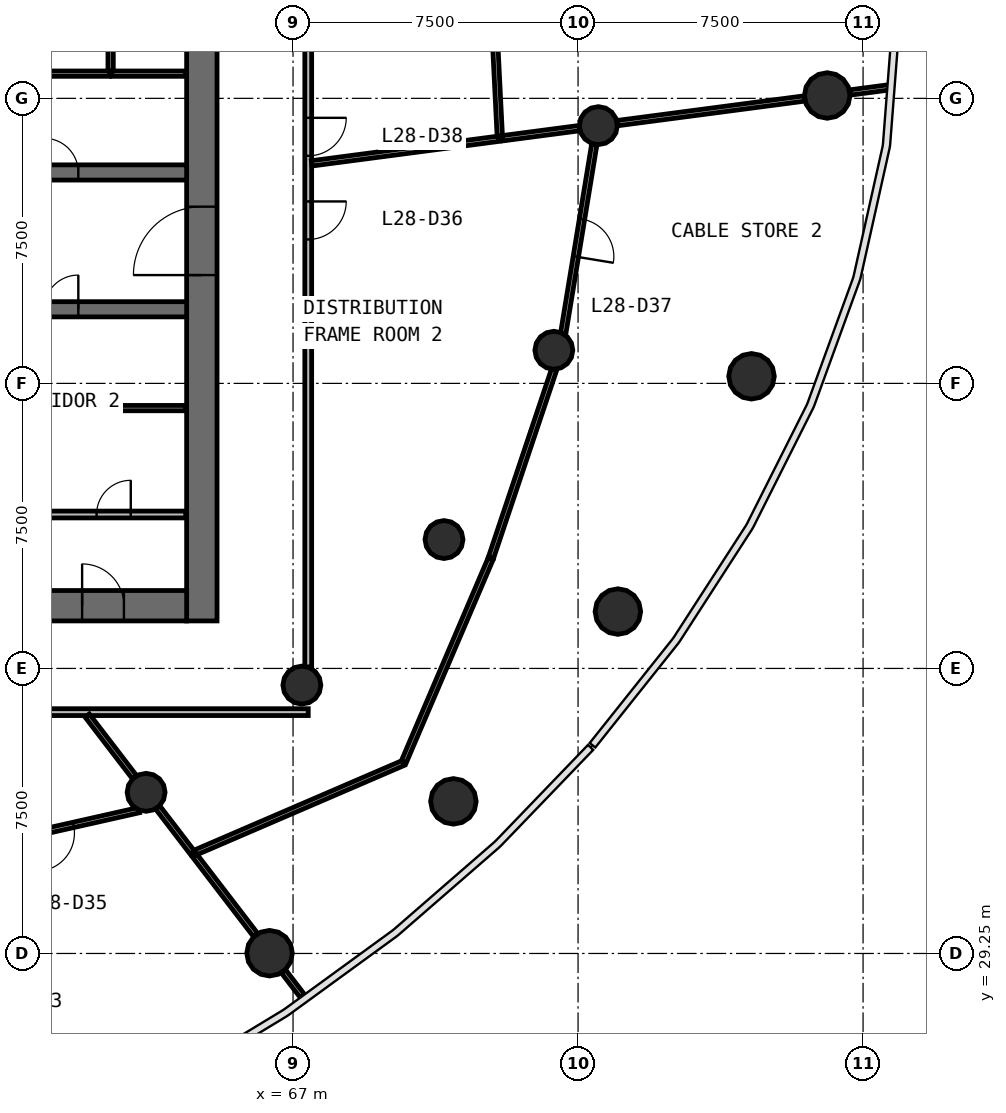
"""IFC4 building model, lengths in metres.
Left out: names, types, materials, properties, quantities, classifications, styles, units other than length and angle.
Written with IfcOpenShell. Run it as: python <this file> out.ifc"""

import sys

from ifc_helpers import new_model, si_unit, direction, frame, frame_2d, origin, origin_2d, place, context, subcontext, project, spatial, rectangle, circle, extrude, source, transform, mapped, element, fill, save


model = new_model("IFC4")
c1 = context("Model", 3, precision=1e-05, world=origin(), true_north=direction((0.0, 1.0)))
c2 = subcontext(c1, "Body", "Model", "MODEL_VIEW")
j1 = project(units=[si_unit("LENGTHUNIT", "METRE"), si_unit("PLANEANGLEUNIT", "RADIAN")], contexts=[c1])
p1 = place(None, origin())
s1 = spatial("IfcSite", under=j1, at=p1, CompositionType="ELEMENT")
p2 = place(p1, origin())
s2 = spatial("IfcBuilding", under=s1, at=p2, CompositionType="ELEMENT")
p3 = place(p2, frame((0.0, 0.0, 120.8)))
s3 = spatial("IfcBuildingStorey", under=s2, at=p3, CompositionType="ELEMENT", Elevation=120.8)
p4 = place(p3, frame((64.6, 38.0, 0.0), z_axis=(0.0, 0.0, 1.0), x_axis=(0.0, 1.0, 0.0)))
e1 = element("IfcWall", 1, at=p4, inside=s3, PredefinedType="SHEAR", context=c2, shape_type="SweptSolid", body=[
    extrude(rectangle(XDim=20.0, YDim=0.8, at=frame_2d((10.0, 0.0))), origin(), (0.0, 0.0, 1.0), 4.1),
])
p5 = place(p4, frame((9.1, 0.0, 0.0)))
e2 = element("IfcOpeningElement", 2, at=p5, cuts=e1, PredefinedType="OPENING", context=c2, shape_type="SweptSolid", body=[
    extrude(rectangle(XDim=1.8, YDim=2.1, at=frame_2d((0.9, 1.05))), frame((0.0, 0.41, 0.0), z_axis=(0.0, -1.0, 0.0), x_axis=(1.0, 0.0, 0.0)), (0.0, 0.0, 1.0), 0.82),
])
p6 = place(p3, frame((39.8, 38.4, 0.0), z_axis=(0.0, 0.0, 1.0), x_axis=(1.0, 0.0, 0.0)))
e3 = element("IfcWall", 3, at=p6, inside=s3, PredefinedType="SHEAR", context=c2, shape_type="SweptSolid", body=[
    extrude(rectangle(XDim=24.4, YDim=0.8, at=frame_2d((12.2, 0.0))), origin(), (0.0, 0.0, 1.0), 4.1),
])
p7 = place(p6, frame((21.65, 0.0, 0.0)))
e4 = element("IfcOpeningElement", 4, at=p7, cuts=e3, PredefinedType="OPENING", context=c2, shape_type="SweptSolid", body=[
    extrude(rectangle(XDim=1.1, YDim=2.1, at=frame_2d((0.55, 1.05))), frame((0.0, 0.41, 0.0), z_axis=(0.0, -1.0, 0.0), x_axis=(1.0, 0.0, 0.0)), (0.0, 0.0, 1.0), 0.82),
])
p8 = place(p6, frame((2.15, 0.0, 0.0)))
e5 = element("IfcOpeningElement", 5, at=p8, cuts=e3, PredefinedType="OPENING", context=c2, shape_type="SweptSolid", body=[
    extrude(rectangle(XDim=1.1, YDim=2.1, at=frame_2d((0.55, 1.05))), frame((0.0, 0.41, 0.0), z_axis=(0.0, -1.0, 0.0), x_axis=(1.0, 0.0, 0.0)), (0.0, 0.0, 1.0), 0.82),
])
p9 = place(p3, frame((39.8, 49.8, 0.0), z_axis=(0.0, 0.0, 1.0), x_axis=(1.0, 0.0, 0.0)))
e6 = element("IfcWall", 6, at=p9, inside=s3, PredefinedType="SHEAR", context=c2, shape_type="SweptSolid", body=[
    extrude(rectangle(XDim=24.4, YDim=0.4, at=frame_2d((12.2, 0.0))), origin(), (0.0, 0.0, 1.0), 4.1),
])
p10 = place(p9, frame((4.7, 0.0, 0.0)))
e7 = element("IfcOpeningElement", 7, at=p10, cuts=e6, PredefinedType="OPENING", context=c2, shape_type="SweptSolid", body=[
    extrude(rectangle(XDim=1.1, YDim=2.1, at=frame_2d((0.55, 1.05))), frame((0.0, 0.21, 0.0), z_axis=(0.0, -1.0, 0.0), x_axis=(1.0, 0.0, 0.0)), (0.0, 0.0, 1.0), 0.42),
])
p11 = place(p9, frame((7.2, 0.0, 0.0)))
e8 = element("IfcOpeningElement", 8, at=p11, cuts=e6, PredefinedType="OPENING", context=c2, shape_type="SweptSolid", body=[
    extrude(rectangle(XDim=1.1, YDim=2.1, at=frame_2d((0.55, 1.05))), frame((0.0, 0.21, 0.0), z_axis=(0.0, -1.0, 0.0), x_axis=(1.0, 0.0, 0.0)), (0.0, 0.0, 1.0), 0.42),
])
p12 = place(p9, frame((9.7, 0.0, 0.0)))
e9 = element("IfcOpeningElement", 9, at=p12, cuts=e6, PredefinedType="OPENING", context=c2, shape_type="SweptSolid", body=[
    extrude(rectangle(XDim=1.1, YDim=2.1, at=frame_2d((0.55, 1.05))), frame((0.0, 0.21, 0.0), z_axis=(0.0, -1.0, 0.0), x_axis=(1.0, 0.0, 0.0)), (0.0, 0.0, 1.0), 0.42),
])
p13 = place(p9, frame((1.1, 0.0, 0.0)))
e10 = element("IfcOpeningElement", 10, at=p13, cuts=e6, PredefinedType="OPENING", context=c2, shape_type="SweptSolid", body=[
    extrude(rectangle(XDim=1.8, YDim=2.4, at=frame_2d((0.9, 1.2))), frame((0.0, 0.21, 0.0), z_axis=(0.0, -1.0, 0.0), x_axis=(1.0, 0.0, 0.0)), (0.0, 0.0, 1.0), 0.42),
])
p14 = place(p9, frame((20.65, 0.0, 0.0)))
e11 = element("IfcOpeningElement", 11, at=p14, cuts=e6, PredefinedType="OPENING", context=c2, shape_type="SweptSolid", body=[
    extrude(rectangle(XDim=0.9, YDim=2.1, at=frame_2d((0.45, 1.05))), frame((0.0, 0.21, 0.0), z_axis=(0.0, -1.0, 0.0), x_axis=(1.0, 0.0, 0.0)), (0.0, 0.0, 1.0), 0.42),
])
p15 = place(p9, frame((11.85, 0.0, 0.0)))
e12 = element("IfcOpeningElement", 12, at=p15, cuts=e6, PredefinedType="OPENING", context=c2, shape_type="SweptSolid", body=[
    extrude(rectangle(XDim=0.9, YDim=2.1, at=frame_2d((0.45, 1.05))), frame((0.0, 0.21, 0.0), z_axis=(0.0, -1.0, 0.0), x_axis=(1.0, 0.0, 0.0)), (0.0, 0.0, 1.0), 0.42),
])
p16 = place(p3, frame((39.8, 46.2, 0.0), z_axis=(0.0, 0.0, 1.0), x_axis=(1.0, 0.0, 0.0)))
e13 = element("IfcWall", 13, at=p16, inside=s3, PredefinedType="SHEAR", context=c2, shape_type="SweptSolid", body=[
    extrude(rectangle(XDim=24.4, YDim=0.4, at=frame_2d((12.2, 0.0))), origin(), (0.0, 0.0, 1.0), 4.1),
])
p17 = place(p16, frame((4.7, 0.0, 0.0)))
e14 = element("IfcOpeningElement", 14, at=p17, cuts=e13, PredefinedType="OPENING", context=c2, shape_type="SweptSolid", body=[
    extrude(rectangle(XDim=1.1, YDim=2.1, at=frame_2d((0.55, 1.05))), frame((0.0, 0.21, 0.0), z_axis=(0.0, -1.0, 0.0), x_axis=(1.0, 0.0, 0.0)), (0.0, 0.0, 1.0), 0.42),
])
p18 = place(p16, frame((7.2, 0.0, 0.0)))
e15 = element("IfcOpeningElement", 15, at=p18, cuts=e13, PredefinedType="OPENING", context=c2, shape_type="SweptSolid", body=[
    extrude(rectangle(XDim=1.1, YDim=2.1, at=frame_2d((0.55, 1.05))), frame((0.0, 0.21, 0.0), z_axis=(0.0, -1.0, 0.0), x_axis=(1.0, 0.0, 0.0)), (0.0, 0.0, 1.0), 0.42),
])
p19 = place(p16, frame((9.7, 0.0, 0.0)))
e16 = element("IfcOpeningElement", 16, at=p19, cuts=e13, PredefinedType="OPENING", context=c2, shape_type="SweptSolid", body=[
    extrude(rectangle(XDim=1.1, YDim=2.1, at=frame_2d((0.55, 1.05))), frame((0.0, 0.21, 0.0), z_axis=(0.0, -1.0, 0.0), x_axis=(1.0, 0.0, 0.0)), (0.0, 0.0, 1.0), 0.42),
])
p20 = place(p16, frame((20.65, 0.0, 0.0)))
e17 = element("IfcOpeningElement", 17, at=p20, cuts=e13, PredefinedType="OPENING", context=c2, shape_type="SweptSolid", body=[
    extrude(rectangle(XDim=0.9, YDim=2.1, at=frame_2d((0.45, 1.05))), frame((0.0, 0.21, 0.0), z_axis=(0.0, -1.0, 0.0), x_axis=(1.0, 0.0, 0.0)), (0.0, 0.0, 1.0), 0.42),
])
p21 = place(p16, frame((2.85, 0.0, 0.0)))
e18 = element("IfcOpeningElement", 18, at=p21, cuts=e13, PredefinedType="OPENING", context=c2, shape_type="SweptSolid", body=[
    extrude(rectangle(XDim=0.9, YDim=2.1, at=frame_2d((0.45, 1.05))), frame((0.0, 0.21, 0.0), z_axis=(0.0, -1.0, 0.0), x_axis=(1.0, 0.0, 0.0)), (0.0, 0.0, 1.0), 0.42),
])
p22 = place(p16, frame((11.85, 0.0, 0.0)))
e19 = element("IfcOpeningElement", 19, at=p22, cuts=e13, PredefinedType="OPENING", context=c2, shape_type="SweptSolid", body=[
    extrude(rectangle(XDim=0.9, YDim=2.1, at=frame_2d((0.45, 1.05))), frame((0.0, 0.21, 0.0), z_axis=(0.0, -1.0, 0.0), x_axis=(1.0, 0.0, 0.0)), (0.0, 0.0, 1.0), 0.42),
])
m1 = source(origin(), c2, "Body", "SweptSolid", [
    extrude(circle(Radius=0.6, at=origin_2d()), origin(), (0.0, 0.0, 1.0), 4.1),
])
for number, where, z_axis, x_axis in (
    (20, (81.056, 51.825, 0.0), (0.0, 0.0, 1.0), (1.0, 0.0, 0.0)),
    (21, (66.382, 29.257, 0.0), (0.0, 0.0, 1.0), (1.0, 0.0, 0.0)),
    (22, (71.22, 33.252, 0.0), (0.0, 0.0, 1.0), (1.0, 0.0, 0.0)),
    (23, (75.548, 38.246, 0.0), (0.0, 0.0, 1.0), (1.0, 0.0, 0.0)),
    (24, (79.064, 44.437, 0.0), (0.0, 0.0, 1.0), (1.0, 0.0, 0.0)),
):
    element("IfcColumn", number, at=place(p3, frame(where, z_axis=z_axis, x_axis=x_axis)), inside=s3, PredefinedType="COLUMN", context=c2, shape_type="MappedRepresentation", body=[
        mapped(m1, transform((0.0, 0.0, 0.0), scale=1.0)),
    ])
m2 = source(origin(), c2, "Body", "SweptSolid", [
    extrude(circle(Radius=0.5, at=origin_2d()), origin(), (0.0, 0.0, 1.0), 4.1),
])
for number, where, z_axis, x_axis in (
    (25, (75.034, 51.032, 0.0), (0.0, 0.0, 1.0), (1.0, 0.0, 0.0)),
    (26, (63.134, 33.49, 0.0), (0.0, 0.0, 1.0), (1.0, 0.0, 0.0)),
    (27, (67.232, 36.312, 0.0), (0.0, 0.0, 1.0), (1.0, 0.0, 0.0)),
    (28, (70.972, 40.141, 0.0), (0.0, 0.0, 1.0), (1.0, 0.0, 0.0)),
    (29, (73.863, 45.122, 0.0), (0.0, 0.0, 1.0), (1.0, 0.0, 0.0)),
):
    element("IfcColumn", number, at=place(p3, frame(where, z_axis=z_axis, x_axis=x_axis)), inside=s3, PredefinedType="COLUMN", context=c2, shape_type="MappedRepresentation", body=[
        mapped(m2, transform((0.0, 0.0, 0.0), scale=1.0)),
    ])
p23 = place(p3, frame((67.4, 35.6, 0.0), z_axis=(0.0, 0.0, 1.0), x_axis=(-1.0, 0.0, 0.0)))
e30 = element("IfcWall", 30, at=p23, inside=s3, PredefinedType="PARTITIONING", context=c2, shape_type="SweptSolid", body=[
    extrude(rectangle(XDim=30.8, YDim=0.18, at=frame_2d((15.4, 0.0))), origin(), (0.0, 0.0, 1.0), 2.9),
])
p24 = place(p23, frame((20.95, 0.0, 0.0)))
e31 = element("IfcOpeningElement", 31, at=p24, cuts=e30, PredefinedType="OPENING", context=c2, shape_type="SweptSolid", body=[
    extrude(rectangle(XDim=1.0, YDim=2.1, at=frame_2d((0.5, 1.05))), frame((0.0, 0.1, 0.0), z_axis=(0.0, -1.0, 0.0), x_axis=(1.0, 0.0, 0.0)), (0.0, 0.0, 1.0), 0.2),
])
p25 = place(p23, frame((14.95, 0.0, 0.0)))
e32 = element("IfcOpeningElement", 32, at=p25, cuts=e30, PredefinedType="OPENING", context=c2, shape_type="SweptSolid", body=[
    extrude(rectangle(XDim=1.0, YDim=2.1, at=frame_2d((0.5, 1.05))), frame((0.0, 0.1, 0.0), z_axis=(0.0, -1.0, 0.0), x_axis=(1.0, 0.0, 0.0)), (0.0, 0.0, 1.0), 0.2),
])
p26 = place(p23, frame((12.55, 0.0, 0.0)))
e33 = element("IfcOpeningElement", 33, at=p26, cuts=e30, PredefinedType="OPENING", context=c2, shape_type="SweptSolid", body=[
    extrude(rectangle(XDim=1.0, YDim=2.1, at=frame_2d((0.5, 1.05))), frame((0.0, 0.1, 0.0), z_axis=(0.0, -1.0, 0.0), x_axis=(1.0, 0.0, 0.0)), (0.0, 0.0, 1.0), 0.2),
])
p27 = place(p3, frame((67.4, 60.37, 0.0), z_axis=(0.0, 0.0, 1.0), x_axis=(0.0, -1.0, 0.0)))
e34 = element("IfcWall", 34, at=p27, inside=s3, PredefinedType="PARTITIONING", context=c2, shape_type="SweptSolid", body=[
    extrude(rectangle(XDim=23.583, YDim=0.18, at=frame_2d((11.791, 0.0))), origin(), (0.0, 0.0, 1.0), 2.9),
])
p28 = place(p27, frame((11.333, 0.0, 0.0)))
e35 = element("IfcOpeningElement", 35, at=p28, cuts=e34, PredefinedType="OPENING", context=c2, shape_type="SweptSolid", body=[
    extrude(rectangle(XDim=1.0, YDim=2.1, at=frame_2d((0.5, 1.05))), frame((0.0, 0.1, 0.0), z_axis=(0.0, -1.0, 0.0), x_axis=(1.0, 0.0, 0.0)), (0.0, 0.0, 1.0), 0.2),
])
p29 = place(p27, frame((9.133, 0.0, 0.0)))
e36 = element("IfcOpeningElement", 36, at=p29, cuts=e34, PredefinedType="OPENING", context=c2, shape_type="SweptSolid", body=[
    extrude(rectangle(XDim=1.0, YDim=2.1, at=frame_2d((0.5, 1.05))), frame((0.0, 0.1, 0.0), z_axis=(0.0, -1.0, 0.0), x_axis=(1.0, 0.0, 0.0)), (0.0, 0.0, 1.0), 0.2),
])
p30 = place(p3, frame((60.23, 40.8, 0.0), z_axis=(0.0, 0.0, 1.0), x_axis=(1.0, 0.0, 0.0)))
e37 = element("IfcWall", 37, at=p30, inside=s3, PredefinedType="PARTITIONING", context=c2, shape_type="SweptSolid", body=[
    extrude(rectangle(XDim=3.95, YDim=0.18, at=frame_2d((1.975, 0.0))), origin(), (0.0, 0.0, 1.0), 3.7),
])
p31 = place(p30, frame((1.6, 0.0, 0.0)))
e38 = element("IfcOpeningElement", 38, at=p31, cuts=e37, PredefinedType="OPENING", context=c2, shape_type="SweptSolid", body=[
    extrude(rectangle(XDim=0.9, YDim=2.1, at=frame_2d((0.45, 1.05))), frame((0.0, 0.1, 0.0), z_axis=(0.0, -1.0, 0.0), x_axis=(1.0, 0.0, 0.0)), (0.0, 0.0, 1.0), 0.2),
])
p32 = place(p3, frame((64.369, 31.88, 0.0), z_axis=(0.0, 0.0, 1.0), x_axis=(0.918435041442, 0.395571832481, 0.0)))
e39 = element("IfcWall", 39, at=p32, inside=s3, PredefinedType="PARTITIONING", context=c2, shape_type="SweptSolid", body=[
    extrude(rectangle(XDim=6.024, YDim=0.14, at=frame_2d((3.012, 0.0))), origin(), (0.0, 0.0, 1.0), 2.9),
])
p33 = place(p3, frame((69.914, 34.291, 0.0), z_axis=(0.0, 0.0, 1.0), x_axis=(0.393178832884, 0.919462019538, 0.0)))
e40 = element("IfcWall", 40, at=p33, inside=s3, PredefinedType="PARTITIONING", context=c2, shape_type="SweptSolid", body=[
    extrude(rectangle(XDim=5.811, YDim=0.14, at=frame_2d((2.905, 0.0))), origin(), (0.0, 0.0, 1.0), 2.9),
])
p34 = place(p3, frame((72.444, 50.691, 0.0), z_axis=(0.0, 0.0, 1.0), x_axis=(-0.049544491965, 0.998771917565, 0.0)))
e41 = element("IfcWall", 41, at=p34, inside=s3, PredefinedType="PARTITIONING", context=c2, shape_type="SweptSolid", body=[
    extrude(rectangle(XDim=5.637, YDim=0.14, at=frame_2d((2.819, 0.0))), origin(), (0.0, 0.0, 1.0), 2.9),
])
p35 = place(p3, frame((72.208, 39.662, 0.0), z_axis=(0.0, 0.0, 1.0), x_axis=(0.318132842264, 0.948046145856, 0.0)))
e42 = element("IfcWall", 42, at=p35, inside=s3, PredefinedType="PARTITIONING", context=c2, shape_type="SweptSolid", body=[
    extrude(rectangle(XDim=5.227, YDim=0.14, at=frame_2d((2.613, 0.0))), origin(), (0.0, 0.0, 1.0), 2.9),
])
p36 = place(p3, frame((67.49, 50.039, 0.0), z_axis=(0.0, 0.0, 1.0), x_axis=(0.991445927378, 0.130518094863, 0.0)))
e43 = element("IfcWall", 43, at=p36, inside=s3, PredefinedType="PARTITIONING", context=c2, shape_type="SweptSolid", body=[
    extrude(rectangle(XDim=4.966, YDim=0.14, at=frame_2d((2.483, 0.0))), origin(), (0.0, 0.0, 1.0), 2.9),
])
p37 = place(p3, frame((74.927, 50.539, 0.0), z_axis=(0.0, 0.0, 1.0), x_axis=(-0.16231055227, -0.986739724863, 0.0)))
e44 = element("IfcWall", 44, at=p37, inside=s3, PredefinedType="PARTITIONING", context=c2, shape_type="SweptSolid", body=[
    extrude(rectangle(XDim=5.043, YDim=0.14, at=frame_2d((2.522, 0.0))), origin(), (0.0, 0.0, 1.0), 2.9),
])
p38 = place(p37, frame((1.993, 0.0, 0.0)))
e45 = element("IfcOpeningElement", 45, at=p38, cuts=e44, PredefinedType="OPENING", context=c2, shape_type="SweptSolid", body=[
    extrude(rectangle(XDim=1.0, YDim=2.1, at=frame_2d((0.5, 1.05))), frame((0.0, 0.08, 0.0), z_axis=(0.0, -1.0, 0.0), x_axis=(1.0, 0.0, 0.0)), (0.0, 0.0, 1.0), 0.16),
])
p39 = place(p3, frame((75.534, 51.098, 0.0), z_axis=(0.0, 0.0, 1.0), x_axis=(0.991443414541, 0.130537181533, 0.0)))
e46 = element("IfcWall", 46, at=p39, inside=s3, PredefinedType="PARTITIONING", context=c2, shape_type="SweptSolid", body=[
    extrude(rectangle(XDim=4.966, YDim=0.14, at=frame_2d((2.483, 0.0))), origin(), (0.0, 0.0, 1.0), 2.9),
])
p40 = place(p3, frame((62.946, 33.021, 0.0), z_axis=(0.0, 0.0, 1.0), x_axis=(-0.975566521818, -0.219704259192, 0.0)))
e47 = element("IfcWall", 47, at=p40, inside=s3, PredefinedType="PARTITIONING", context=c2, shape_type="SweptSolid", body=[
    extrude(rectangle(XDim=4.416, YDim=0.14, at=frame_2d((2.208, 0.0))), origin(), (0.0, 0.0, 1.0), 2.9),
])
p41 = place(p40, frame((1.766, 0.0, 0.0)))
e48 = element("IfcOpeningElement", 48, at=p41, cuts=e47, PredefinedType="OPENING", context=c2, shape_type="SweptSolid", body=[
    extrude(rectangle(XDim=1.0, YDim=2.1, at=frame_2d((0.5, 1.05))), frame((0.0, 0.08, 0.0), z_axis=(0.0, -1.0, 0.0), x_axis=(1.0, 0.0, 0.0)), (0.0, 0.0, 1.0), 0.16),
])
p42 = place(p3, frame((60.23, 43.6, 0.0), z_axis=(0.0, 0.0, 1.0), x_axis=(1.0, 0.0, 0.0)))
e49 = element("IfcWall", 49, at=p42, inside=s3, PredefinedType="PARTITIONING", context=c2, shape_type="SweptSolid", body=[
    extrude(rectangle(XDim=3.95, YDim=0.14, at=frame_2d((1.975, 0.0))), origin(), (0.0, 0.0, 1.0), 2.9),
])
p43 = place(p3, frame((62.2, 52.4, 0.0), z_axis=(0.0, 0.0, 1.0), x_axis=(0.0, 1.0, 0.0)))
e50 = element("IfcWall", 50, at=p43, inside=s3, PredefinedType="PARTITIONING", context=c2, shape_type="SweptSolid", body=[
    extrude(rectangle(XDim=2.71, YDim=0.14, at=frame_2d((1.355, 0.0))), origin(), (0.0, 0.0, 1.0), 2.9),
])
p44 = place(p3, frame((64.413, 31.823, 0.0), z_axis=(0.0, 0.0, 1.0), x_axis=(0.608786176841, -0.793334349998, 0.0)))
e51 = element("IfcWall", 51, at=p44, inside=s3, PredefinedType="PARTITIONING", context=c2, shape_type="SweptSolid", body=[
    extrude(rectangle(XDim=2.63, YDim=0.14, at=frame_2d((1.315, 0.0))), origin(), (0.0, 0.0, 1.0), 2.9),
])
p45 = place(p3, frame((61.584, 35.51, 0.0), z_axis=(0.0, 0.0, 1.0), x_axis=(0.608727763541, -0.793379171578, 0.0)))
e52 = element("IfcWall", 52, at=p45, inside=s3, PredefinedType="PARTITIONING", context=c2, shape_type="SweptSolid", body=[
    extrude(rectangle(XDim=2.042, YDim=0.14, at=frame_2d((1.021, 0.0))), origin(), (0.0, 0.0, 1.0), 2.9),
])
p46 = place(p3, frame((72.513, 50.701, 0.0), z_axis=(0.0, 0.0, 1.0), x_axis=(0.991453480012, 0.130460710456, 0.0)))
e53 = element("IfcWall", 53, at=p46, inside=s3, PredefinedType="PARTITIONING", context=c2, shape_type="SweptSolid", body=[
    extrude(rectangle(XDim=2.038, YDim=0.14, at=frame_2d((1.019, 0.0))), origin(), (0.0, 0.0, 1.0), 2.9),
])
p47 = place(p3, frame((62.17, 52.4, 0.0), z_axis=(0.0, 0.0, 1.0), x_axis=(-1.0, 0.0, 0.0)))
e54 = element("IfcWall", 54, at=p47, inside=s3, PredefinedType="PARTITIONING", context=c2, shape_type="SweptSolid", body=[
    extrude(rectangle(XDim=1.94, YDim=0.14, at=frame_2d((0.97, 0.0))), origin(), (0.0, 0.0, 1.0), 2.9),
])
p48 = place(p3, frame((64.18, 52.4, 0.0), z_axis=(0.0, 0.0, 1.0), x_axis=(-1.0, 0.0, 0.0)))
e55 = element("IfcWall", 55, at=p48, inside=s3, PredefinedType="PARTITIONING", context=c2, shape_type="SweptSolid", body=[
    extrude(rectangle(XDim=1.95, YDim=0.14, at=frame_2d((0.975, 0.0))), origin(), (0.0, 0.0, 1.0), 2.9),
])
p49 = place(p3, frame((63.441, 33.09, 0.0), z_axis=(0.0, 0.0, 1.0), x_axis=(0.608692090741, -0.793406540601, 0.0)))
e56 = element("IfcWall", 56, at=p49, inside=s3, PredefinedType="PARTITIONING", context=c2, shape_type="SweptSolid", body=[
    extrude(rectangle(XDim=1.495, YDim=0.14, at=frame_2d((0.748, 0.0))), origin(), (0.0, 0.0, 1.0), 2.9),
])
p50 = place(p3, frame((81.656, 51.904, 0.0), z_axis=(0.0, 0.0, 1.0), x_axis=(0.991445519925, 0.130521189931, 0.0)))
e57 = element("IfcWall", 57, at=p50, inside=s3, PredefinedType="PARTITIONING", context=c2, shape_type="SweptSolid", body=[
    extrude(rectangle(XDim=1.042, YDim=0.14, at=frame_2d((0.521, 0.0))), origin(), (0.0, 0.0, 1.0), 2.9),
])
p51 = place(p3, frame((66.75, 28.778, 0.0), z_axis=(0.0, 0.0, 1.0), x_axis=(0.608749278859, -0.793362663281, 0.0)))
e58 = element("IfcWall", 58, at=p51, inside=s3, PredefinedType="PARTITIONING", context=c2, shape_type="SweptSolid", body=[
    extrude(rectangle(XDim=0.823, YDim=0.14, at=frame_2d((0.411, 0.0))), origin(), (0.0, 0.0, 1.0), 2.9),
])
m3 = source(origin(), c2, "Body", "SweptSolid", [
    extrude(rectangle(XDim=1.8, YDim=2.1, at=frame_2d((0.9, 1.05))), frame((0.0, 0.025, 0.0), z_axis=(0.0, -1.0, 0.0), x_axis=(1.0, 0.0, 0.0)), (0.0, 0.0, 1.0), 0.05),
])
p52 = place(p5, origin())
e59 = element("IfcDoor", 59, at=p52, inside=s3, OperationType="SINGLE_SWING_LEFT", PredefinedType="DOOR", context=c2, shape_type="MappedRepresentation", body=[
    mapped(m3, transform((0.0, 0.0, 0.0), scale=1.0)),
])
fill(e2, e59)
m4 = source(origin(), c2, "Body", "SweptSolid", [
    extrude(rectangle(XDim=1.1, YDim=2.1, at=frame_2d((0.55, 1.05))), frame((0.0, 0.025, 0.0), z_axis=(0.0, -1.0, 0.0), x_axis=(1.0, 0.0, 0.0)), (0.0, 0.0, 1.0), 0.05),
])
p53 = place(p7, origin())
e60 = element("IfcDoor", 60, at=p53, inside=s3, OperationType="SINGLE_SWING_LEFT", PredefinedType="DOOR", context=c2, shape_type="MappedRepresentation", body=[
    mapped(m4, transform((0.0, 0.0, 0.0), scale=1.0)),
])
fill(e4, e60)
m5 = source(origin(), c2, "Body", "SweptSolid", [
    extrude(rectangle(XDim=1.0, YDim=2.1, at=frame_2d((0.5, 1.05))), frame((0.0, 0.025, 0.0), z_axis=(0.0, -1.0, 0.0), x_axis=(1.0, 0.0, 0.0)), (0.0, 0.0, 1.0), 0.05),
])
p54 = place(p41, origin())
e61 = element("IfcDoor", 61, at=p54, inside=s3, OperationType="SINGLE_SWING_RIGHT", PredefinedType="DOOR", context=c2, shape_type="MappedRepresentation", body=[
    mapped(m5, transform((0.0, 0.0, 0.0), scale=1.0)),
])
fill(e48, e61)
p55 = place(p28, origin())
e62 = element("IfcDoor", 62, at=p55, inside=s3, OperationType="SINGLE_SWING_LEFT", PredefinedType="DOOR", context=c2, shape_type="MappedRepresentation", body=[
    mapped(m5, transform((0.0, 0.0, 0.0), scale=1.0)),
])
fill(e35, e62)
p56 = place(p38, origin())
e63 = element("IfcDoor", 63, at=p56, inside=s3, OperationType="SINGLE_SWING_RIGHT", PredefinedType="DOOR", context=c2, shape_type="MappedRepresentation", body=[
    mapped(m5, transform((0.0, 0.0, 0.0), scale=1.0)),
])
fill(e45, e63)
p57 = place(p29, origin())
e64 = element("IfcDoor", 64, at=p57, inside=s3, OperationType="SINGLE_SWING_LEFT", PredefinedType="DOOR", context=c2, shape_type="MappedRepresentation", body=[
    mapped(m5, transform((0.0, 0.0, 0.0), scale=1.0)),
])
fill(e36, e64)
m6 = source(origin(), c2, "Body", "SweptSolid", [
    extrude(rectangle(XDim=0.9, YDim=2.1, at=frame_2d((0.45, 1.05))), frame((0.0, 0.025, 0.0), z_axis=(0.0, -1.0, 0.0), x_axis=(1.0, 0.0, 0.0)), (0.0, 0.0, 1.0), 0.05),
])
p58 = place(p20, origin())
e65 = element("IfcDoor", 65, at=p58, inside=s3, OperationType="SINGLE_SWING_RIGHT", PredefinedType="DOOR", context=c2, shape_type="MappedRepresentation", body=[
    mapped(m6, transform((0.0, 0.0, 0.0), scale=1.0)),
])
fill(e17, e65)
p59 = place(p14, origin())
e66 = element("IfcDoor", 66, at=p59, inside=s3, OperationType="SINGLE_SWING_LEFT", PredefinedType="DOOR", context=c2, shape_type="MappedRepresentation", body=[
    mapped(m6, transform((0.0, 0.0, 0.0), scale=1.0)),
])
fill(e11, e66)
p60 = place(p31, origin())
e67 = element("IfcDoor", 67, at=p60, inside=s3, OperationType="SINGLE_SWING_RIGHT", PredefinedType="DOOR", context=c2, shape_type="MappedRepresentation", body=[
    mapped(m6, transform((0.0, 0.0, 0.0), scale=1.0)),
])
fill(e38, e67)
save(model, sys.argv[1])
